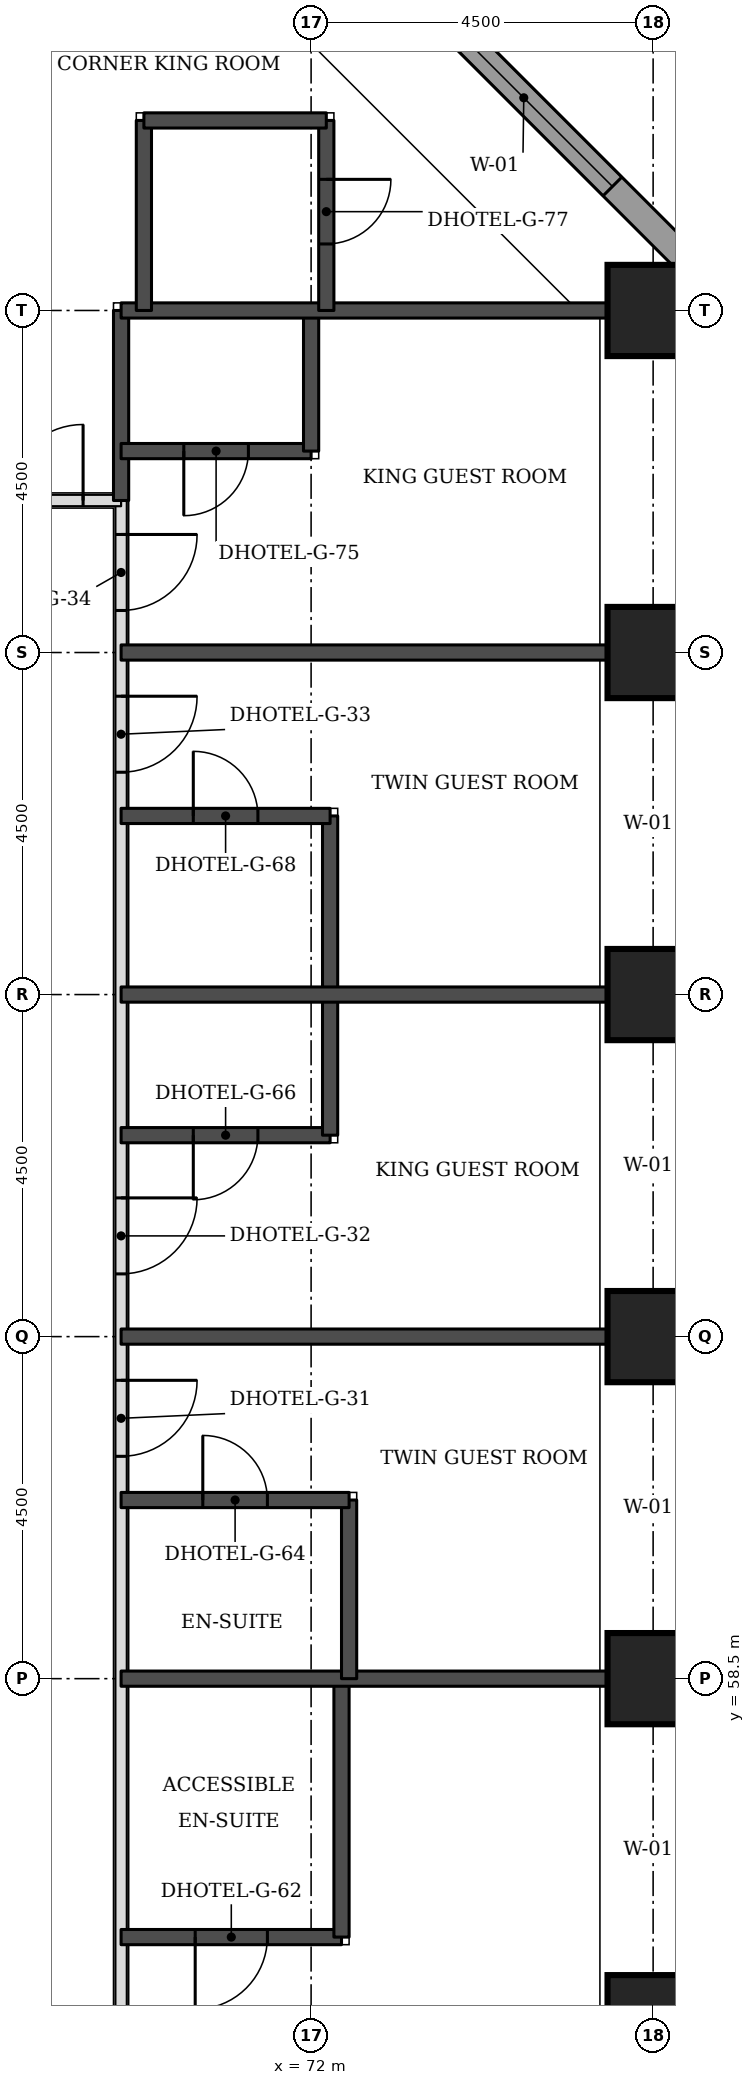
"""IFC4 building model, lengths in metres.
Left out: names, types, materials, properties, quantities, classifications, styles, units other than length and angle.
Written with IfcOpenShell. Run it as: python <this file> out.ifc"""

import sys

from ifc_helpers import new_model, si_unit, direction, frame, frame_2d, origin, origin_2d, place, context, subcontext, project, spatial, rectangle, extrude, element, fill, save


model = new_model("IFC4")
c1 = context("Model", 3, precision=1e-05, world=origin(), true_north=direction((0.0, 1.0)))
c2 = subcontext(c1, "Body", "Model", "MODEL_VIEW")
j1 = project(units=[si_unit("LENGTHUNIT", "METRE"), si_unit("PLANEANGLEUNIT", "RADIAN")], contexts=[c1])
p1 = place(None, origin())
s1 = spatial("IfcSite", under=j1, at=p1, CompositionType="ELEMENT")
p2 = place(p1, origin())
s2 = spatial("IfcBuilding", under=s1, at=p2, CompositionType="ELEMENT")
p3 = place(p2, frame((0.0, 0.0, 66.0)))
s3 = spatial("IfcBuildingStorey", under=s2, at=p3, CompositionType="ELEMENT", Elevation=66.0)
for number, where, z_axis, x_axis in (
    (1, (76.5, 54.0, 0.0), (0.0, 0.0, 1.0), (1.0, 0.0, 0.0)),
    (2, (76.5, 58.5, 0.0), (0.0, 0.0, 1.0), (1.0, 0.0, 0.0)),
    (3, (76.5, 63.0, 0.0), (0.0, 0.0, 1.0), (1.0, 0.0, 0.0)),
    (4, (76.5, 67.5, 0.0), (0.0, 0.0, 1.0), (1.0, 0.0, 0.0)),
    (5, (76.5, 72.0, 0.0), (0.0, 0.0, 1.0), (1.0, 0.0, 0.0)),
    (6, (76.5, 76.5, 0.0), (0.0, 0.0, 1.0), (1.0, 0.0, 0.0)),
):
    element("IfcColumn", number, at=place(p3, frame(where, z_axis=z_axis, x_axis=x_axis)), inside=s3, PredefinedType="COLUMN", context=c2, shape_type="SweptSolid", body=[
        extrude(rectangle(XDim=1.2, YDim=1.2, at=origin_2d()), origin(), (0.0, 0.0, 1.0), 3.3),
    ])
p4 = place(p3, frame((77.326, 76.77, 0.0), z_axis=(0.0, 0.0, 1.0), x_axis=(-0.707106781187, 0.707106781187, 0.0)))
e7 = element("IfcWall", 7, at=p4, inside=s3, PredefinedType="STANDARD", context=c2, shape_type="SweptSolid", body=[
    extrude(rectangle(XDim=7.151, YDim=0.35, at=frame_2d((3.576, 0.0))), origin(), (0.0, 0.0, 1.0), 3.055),
])
p5 = place(p4, frame((1.926, 0.0, 0.8)))
e8 = element("IfcOpeningElement", 8, at=p5, cuts=e7, PredefinedType="OPENING", context=c2, shape_type="SweptSolid", body=[
    extrude(rectangle(XDim=3.3, YDim=1.5, at=frame_2d((1.65, 0.75))), frame((0.0, 0.185, 0.0), z_axis=(0.0, -1.0, 0.0), x_axis=(1.0, 0.0, 0.0)), (0.0, 0.0, 1.0), 0.37),
])
p6 = place(p3, frame((69.5, 47.5, 0.0), z_axis=(0.0, 0.0, 1.0), x_axis=(0.0, 1.0, 0.0)))
e9 = element("IfcWall", 9, at=p6, inside=s3, PredefinedType="PARTITIONING", context=c2, shape_type="SweptSolid", body=[
    extrude(rectangle(XDim=26.5, YDim=0.15, at=frame_2d((13.25, 0.0))), origin(), (0.0, 0.0, 1.0), 3.08),
])
p7 = place(p6, frame((25.053, 0.0, 0.0)))
e10 = element("IfcOpeningElement", 10, at=p7, cuts=e9, PredefinedType="OPENING", context=c2, shape_type="SweptSolid", body=[
    extrude(rectangle(XDim=1.0, YDim=2.1, at=frame_2d((0.5, 1.05))), frame((0.0, 0.085, 0.0), z_axis=(0.0, -1.0, 0.0), x_axis=(1.0, 0.0, 0.0)), (0.0, 0.0, 1.0), 0.17),
])
p8 = place(p6, frame((22.925, 0.0, 0.0)))
e11 = element("IfcOpeningElement", 11, at=p8, cuts=e9, PredefinedType="OPENING", context=c2, shape_type="SweptSolid", body=[
    extrude(rectangle(XDim=1.0, YDim=2.1, at=frame_2d((0.5, 1.05))), frame((0.0, 0.085, 0.0), z_axis=(0.0, -1.0, 0.0), x_axis=(1.0, 0.0, 0.0)), (0.0, 0.0, 1.0), 0.17),
])
p9 = place(p6, frame((16.325, 0.0, 0.0)))
e12 = element("IfcOpeningElement", 12, at=p9, cuts=e9, PredefinedType="OPENING", context=c2, shape_type="SweptSolid", body=[
    extrude(rectangle(XDim=1.0, YDim=2.1, at=frame_2d((0.5, 1.05))), frame((0.0, 0.085, 0.0), z_axis=(0.0, -1.0, 0.0), x_axis=(1.0, 0.0, 0.0)), (0.0, 0.0, 1.0), 0.17),
])
p10 = place(p6, frame((13.925, 0.0, 0.0)))
e13 = element("IfcOpeningElement", 13, at=p10, cuts=e9, PredefinedType="OPENING", context=c2, shape_type="SweptSolid", body=[
    extrude(rectangle(XDim=1.0, YDim=2.1, at=frame_2d((0.5, 1.05))), frame((0.0, 0.085, 0.0), z_axis=(0.0, -1.0, 0.0), x_axis=(1.0, 0.0, 0.0)), (0.0, 0.0, 1.0), 0.17),
])
p11 = place(p6, frame((4.25, 0.0, 0.0)))
e14 = element("IfcOpeningElement", 14, at=p11, cuts=e9, PredefinedType="OPENING", context=c2, shape_type="SweptSolid", body=[
    extrude(rectangle(XDim=1.1, YDim=2.1, at=frame_2d((0.55, 1.05))), frame((0.0, 0.085, 0.0), z_axis=(0.0, -1.0, 0.0), x_axis=(1.0, 0.0, 0.0)), (0.0, 0.0, 1.0), 0.17),
])
p12 = place(p6, frame((0.447, 0.0, 0.0)))
e15 = element("IfcOpeningElement", 15, at=p12, cuts=e9, PredefinedType="OPENING", context=c2, shape_type="SweptSolid", body=[
    extrude(rectangle(XDim=1.0, YDim=2.1, at=frame_2d((0.5, 1.05))), frame((0.0, 0.085, 0.0), z_axis=(0.0, -1.0, 0.0), x_axis=(1.0, 0.0, 0.0)), (0.0, 0.0, 1.0), 0.17),
])
p13 = place(p3, frame((43.0, 74.0, 0.0), z_axis=(0.0, 0.0, 1.0), x_axis=(1.0, 0.0, 0.0)))
e16 = element("IfcWall", 16, at=p13, inside=s3, PredefinedType="PARTITIONING", context=c2, shape_type="SweptSolid", body=[
    extrude(rectangle(XDim=26.5, YDim=0.15, at=frame_2d((13.25, 0.0))), origin(), (0.0, 0.0, 1.0), 3.08),
])
p14 = place(p13, frame((4.925, 0.0, 0.0)))
e17 = element("IfcOpeningElement", 17, at=p14, cuts=e16, PredefinedType="OPENING", context=c2, shape_type="SweptSolid", body=[
    extrude(rectangle(XDim=1.0, YDim=2.1, at=frame_2d((0.5, 1.05))), frame((0.0, 0.085, 0.0), z_axis=(0.0, -1.0, 0.0), x_axis=(1.0, 0.0, 0.0)), (0.0, 0.0, 1.0), 0.17),
])
p15 = place(p13, frame((7.325, 0.0, 0.0)))
e18 = element("IfcOpeningElement", 18, at=p15, cuts=e16, PredefinedType="OPENING", context=c2, shape_type="SweptSolid", body=[
    extrude(rectangle(XDim=1.0, YDim=2.1, at=frame_2d((0.5, 1.05))), frame((0.0, 0.085, 0.0), z_axis=(0.0, -1.0, 0.0), x_axis=(1.0, 0.0, 0.0)), (0.0, 0.0, 1.0), 0.17),
])
p16 = place(p13, frame((13.925, 0.0, 0.0)))
e19 = element("IfcOpeningElement", 19, at=p16, cuts=e16, PredefinedType="OPENING", context=c2, shape_type="SweptSolid", body=[
    extrude(rectangle(XDim=1.0, YDim=2.1, at=frame_2d((0.5, 1.05))), frame((0.0, 0.085, 0.0), z_axis=(0.0, -1.0, 0.0), x_axis=(1.0, 0.0, 0.0)), (0.0, 0.0, 1.0), 0.17),
])
p17 = place(p13, frame((16.325, 0.0, 0.0)))
e20 = element("IfcOpeningElement", 20, at=p17, cuts=e16, PredefinedType="OPENING", context=c2, shape_type="SweptSolid", body=[
    extrude(rectangle(XDim=1.0, YDim=2.1, at=frame_2d((0.5, 1.05))), frame((0.0, 0.085, 0.0), z_axis=(0.0, -1.0, 0.0), x_axis=(1.0, 0.0, 0.0)), (0.0, 0.0, 1.0), 0.17),
])
p18 = place(p13, frame((22.925, 0.0, 0.0)))
e21 = element("IfcOpeningElement", 21, at=p18, cuts=e16, PredefinedType="OPENING", context=c2, shape_type="SweptSolid", body=[
    extrude(rectangle(XDim=1.0, YDim=2.1, at=frame_2d((0.5, 1.05))), frame((0.0, 0.085, 0.0), z_axis=(0.0, -1.0, 0.0), x_axis=(1.0, 0.0, 0.0)), (0.0, 0.0, 1.0), 0.17),
])
p19 = place(p13, frame((0.5, 0.0, 0.0)))
e22 = element("IfcOpeningElement", 22, at=p19, cuts=e16, PredefinedType="OPENING", context=c2, shape_type="SweptSolid", body=[
    extrude(rectangle(XDim=1.0, YDim=2.1, at=frame_2d((0.5, 1.05))), frame((0.0, 0.085, 0.0), z_axis=(0.0, -1.0, 0.0), x_axis=(1.0, 0.0, 0.0)), (0.0, 0.0, 1.0), 0.17),
])
p20 = place(p13, frame((25.0, 0.0, 0.0)))
e23 = element("IfcOpeningElement", 23, at=p20, cuts=e16, PredefinedType="OPENING", context=c2, shape_type="SweptSolid", body=[
    extrude(rectangle(XDim=1.0, YDim=2.1, at=frame_2d((0.5, 1.05))), frame((0.0, 0.085, 0.0), z_axis=(0.0, -1.0, 0.0), x_axis=(1.0, 0.0, 0.0)), (0.0, 0.0, 1.0), 0.17),
])
p21 = place(p3, frame((69.5, 55.1, 0.0), z_axis=(0.0, 0.0, 1.0), x_axis=(1.0, 0.0, 0.0)))
e24 = element("IfcWall", 24, at=p21, inside=s3, PredefinedType="SOLIDWALL", context=c2, shape_type="SweptSolid", body=[
    extrude(rectangle(XDim=2.9, YDim=0.2, at=frame_2d((1.45, 0.0))), origin(), (0.0, 0.0, 1.0), 3.08),
])
p22 = place(p21, frame((0.975, 0.0, 0.0)))
e25 = element("IfcOpeningElement", 25, at=p22, cuts=e24, PredefinedType="OPENING", context=c2, shape_type="SweptSolid", body=[
    extrude(rectangle(XDim=0.95, YDim=2.1, at=frame_2d((0.475, 1.05))), frame((0.0, 0.11, 0.0), z_axis=(0.0, -1.0, 0.0), x_axis=(1.0, 0.0, 0.0)), (0.0, 0.0, 1.0), 0.22),
])
p23 = place(p3, frame((72.4, 55.1, 0.0), z_axis=(0.0, 0.0, 1.0), x_axis=(0.0, 1.0, 0.0)))
e26 = element("IfcWall", 26, at=p23, inside=s3, PredefinedType="SOLIDWALL", context=c2, shape_type="SweptSolid", body=[
    extrude(rectangle(XDim=3.4, YDim=0.2, at=frame_2d((1.7, 0.0))), origin(), (0.0, 0.0, 1.0), 3.08),
])
p24 = place(p3, frame((69.5, 58.5, 0.0), z_axis=(0.0, 0.0, 1.0), x_axis=(1.0, 0.0, 0.0)))
e27 = element("IfcWall", 27, at=p24, inside=s3, PredefinedType="SOLIDWALL", context=c2, shape_type="SweptSolid", body=[
    extrude(rectangle(XDim=6.4, YDim=0.2, at=frame_2d((3.2, 0.0))), origin(), (0.0, 0.0, 1.0), 3.08),
])
p25 = place(p3, frame((72.5, 58.5, 0.0), z_axis=(0.0, 0.0, 1.0), x_axis=(0.0, 1.0, 0.0)))
e28 = element("IfcWall", 28, at=p25, inside=s3, PredefinedType="SOLIDWALL", context=c2, shape_type="SweptSolid", body=[
    extrude(rectangle(XDim=2.35, YDim=0.2, at=frame_2d((1.175, 0.0))), origin(), (0.0, 0.0, 1.0), 3.08),
])
p26 = place(p3, frame((69.5, 60.85, 0.0), z_axis=(0.0, 0.0, 1.0), x_axis=(1.0, 0.0, 0.0)))
e29 = element("IfcWall", 29, at=p26, inside=s3, PredefinedType="SOLIDWALL", context=c2, shape_type="SweptSolid", body=[
    extrude(rectangle(XDim=3.0, YDim=0.2, at=frame_2d((1.5, 0.0))), origin(), (0.0, 0.0, 1.0), 3.08),
])
p27 = place(p26, frame((1.075, 0.0, 0.0)))
e30 = element("IfcOpeningElement", 30, at=p27, cuts=e29, PredefinedType="OPENING", context=c2, shape_type="SweptSolid", body=[
    extrude(rectangle(XDim=0.85, YDim=2.1, at=frame_2d((0.425, 1.05))), frame((0.0, 0.11, 0.0), z_axis=(0.0, -1.0, 0.0), x_axis=(1.0, 0.0, 0.0)), (0.0, 0.0, 1.0), 0.22),
])
p28 = place(p3, frame((69.5, 63.0, 0.0), z_axis=(0.0, 0.0, 1.0), x_axis=(1.0, 0.0, 0.0)))
e31 = element("IfcWall", 31, at=p28, inside=s3, PredefinedType="SOLIDWALL", context=c2, shape_type="SweptSolid", body=[
    extrude(rectangle(XDim=6.4, YDim=0.2, at=frame_2d((3.2, 0.0))), origin(), (0.0, 0.0, 1.0), 3.08),
])
p29 = place(p3, frame((69.5, 65.65, 0.0), z_axis=(0.0, 0.0, 1.0), x_axis=(1.0, 0.0, 0.0)))
e32 = element("IfcWall", 32, at=p29, inside=s3, PredefinedType="SOLIDWALL", context=c2, shape_type="SweptSolid", body=[
    extrude(rectangle(XDim=2.75, YDim=0.2, at=frame_2d((1.375, 0.0))), origin(), (0.0, 0.0, 1.0), 3.08),
])
p30 = place(p29, frame((0.95, 0.0, 0.0)))
e33 = element("IfcOpeningElement", 33, at=p30, cuts=e32, PredefinedType="OPENING", context=c2, shape_type="SweptSolid", body=[
    extrude(rectangle(XDim=0.85, YDim=2.1, at=frame_2d((0.425, 1.05))), frame((0.0, 0.11, 0.0), z_axis=(0.0, -1.0, 0.0), x_axis=(1.0, 0.0, 0.0)), (0.0, 0.0, 1.0), 0.22),
])
p31 = place(p3, frame((72.25, 65.65, 0.0), z_axis=(0.0, 0.0, 1.0), x_axis=(0.0, 1.0, 0.0)))
e34 = element("IfcWall", 34, at=p31, inside=s3, PredefinedType="SOLIDWALL", context=c2, shape_type="SweptSolid", body=[
    extrude(rectangle(XDim=4.2, YDim=0.2, at=frame_2d((2.1, 0.0))), origin(), (0.0, 0.0, 1.0), 3.08),
])
p32 = place(p3, frame((69.5, 67.5, 0.0), z_axis=(0.0, 0.0, 1.0), x_axis=(1.0, 0.0, 0.0)))
e35 = element("IfcWall", 35, at=p32, inside=s3, PredefinedType="SOLIDWALL", context=c2, shape_type="SweptSolid", body=[
    extrude(rectangle(XDim=6.4, YDim=0.2, at=frame_2d((3.2, 0.0))), origin(), (0.0, 0.0, 1.0), 3.08),
])
p33 = place(p3, frame((69.5, 69.85, 0.0), z_axis=(0.0, 0.0, 1.0), x_axis=(1.0, 0.0, 0.0)))
e36 = element("IfcWall", 36, at=p33, inside=s3, PredefinedType="SOLIDWALL", context=c2, shape_type="SweptSolid", body=[
    extrude(rectangle(XDim=2.75, YDim=0.2, at=frame_2d((1.375, 0.0))), origin(), (0.0, 0.0, 1.0), 3.08),
])
p34 = place(p33, frame((0.95, 0.0, 0.0)))
e37 = element("IfcOpeningElement", 37, at=p34, cuts=e36, PredefinedType="OPENING", context=c2, shape_type="SweptSolid", body=[
    extrude(rectangle(XDim=0.85, YDim=2.1, at=frame_2d((0.425, 1.05))), frame((0.0, 0.11, 0.0), z_axis=(0.0, -1.0, 0.0), x_axis=(1.0, 0.0, 0.0)), (0.0, 0.0, 1.0), 0.22),
])
p35 = place(p3, frame((69.5, 72.0, 0.0), z_axis=(0.0, 0.0, 1.0), x_axis=(1.0, 0.0, 0.0)))
e38 = element("IfcWall", 38, at=p35, inside=s3, PredefinedType="SOLIDWALL", context=c2, shape_type="SweptSolid", body=[
    extrude(rectangle(XDim=6.4, YDim=0.2, at=frame_2d((3.2, 0.0))), origin(), (0.0, 0.0, 1.0), 3.08),
])
p36 = place(p3, frame((69.5, 74.0, 0.0), z_axis=(0.0, 0.0, 1.0), x_axis=(0.0, 1.0, 0.0)))
e39 = element("IfcWall", 39, at=p36, inside=s3, PredefinedType="SOLIDWALL", context=c2, shape_type="SweptSolid", body=[
    extrude(rectangle(XDim=2.5, YDim=0.2, at=frame_2d((1.25, 0.0))), origin(), (0.0, 0.0, 1.0), 3.08),
])
p37 = place(p3, frame((69.5, 74.65, 0.0), z_axis=(0.0, 0.0, 1.0), x_axis=(1.0, 0.0, 0.0)))
e40 = element("IfcWall", 40, at=p37, inside=s3, PredefinedType="SOLIDWALL", context=c2, shape_type="SweptSolid", body=[
    extrude(rectangle(XDim=2.5, YDim=0.2, at=frame_2d((1.25, 0.0))), origin(), (0.0, 0.0, 1.0), 3.08),
])
p38 = place(p37, frame((0.825, 0.0, 0.0)))
e41 = element("IfcOpeningElement", 41, at=p38, cuts=e40, PredefinedType="OPENING", context=c2, shape_type="SweptSolid", body=[
    extrude(rectangle(XDim=0.85, YDim=2.1, at=frame_2d((0.425, 1.05))), frame((0.0, 0.11, 0.0), z_axis=(0.0, -1.0, 0.0), x_axis=(1.0, 0.0, 0.0)), (0.0, 0.0, 1.0), 0.22),
])
p39 = place(p3, frame((72.0, 74.65, 0.0), z_axis=(0.0, 0.0, 1.0), x_axis=(0.0, 1.0, 0.0)))
e42 = element("IfcWall", 42, at=p39, inside=s3, PredefinedType="SOLIDWALL", context=c2, shape_type="SweptSolid", body=[
    extrude(rectangle(XDim=1.85, YDim=0.2, at=frame_2d((0.925, 0.0))), origin(), (0.0, 0.0, 1.0), 3.08),
])
p40 = place(p3, frame((69.5, 76.5, 0.0), z_axis=(0.0, 0.0, 1.0), x_axis=(1.0, 0.0, 0.0)))
e43 = element("IfcWall", 43, at=p40, inside=s3, PredefinedType="SOLIDWALL", context=c2, shape_type="SweptSolid", body=[
    extrude(rectangle(XDim=6.4, YDim=0.2, at=frame_2d((3.2, 0.0))), origin(), (0.0, 0.0, 1.0), 3.08),
])
p41 = place(p3, frame((69.8, 76.5, 0.0), z_axis=(0.0, 0.0, 1.0), x_axis=(0.0, 1.0, 0.0)))
e44 = element("IfcWall", 44, at=p41, inside=s3, PredefinedType="SOLIDWALL", context=c2, shape_type="SweptSolid", body=[
    extrude(rectangle(XDim=2.5, YDim=0.2, at=frame_2d((1.25, 0.0))), origin(), (0.0, 0.0, 1.0), 3.08),
])
p42 = place(p3, frame((72.2, 76.5, 0.0), z_axis=(0.0, 0.0, 1.0), x_axis=(0.0, 1.0, 0.0)))
e45 = element("IfcWall", 45, at=p42, inside=s3, PredefinedType="SOLIDWALL", context=c2, shape_type="SweptSolid", body=[
    extrude(rectangle(XDim=2.5, YDim=0.2, at=frame_2d((1.25, 0.0))), origin(), (0.0, 0.0, 1.0), 3.08),
])
p43 = place(p42, frame((0.875, 0.0, 0.0)))
e46 = element("IfcOpeningElement", 46, at=p43, cuts=e45, PredefinedType="OPENING", context=c2, shape_type="SweptSolid", body=[
    extrude(rectangle(XDim=0.85, YDim=2.1, at=frame_2d((0.425, 1.05))), frame((0.0, 0.11, 0.0), z_axis=(0.0, -1.0, 0.0), x_axis=(1.0, 0.0, 0.0)), (0.0, 0.0, 1.0), 0.22),
])
p44 = place(p3, frame((69.8, 79.0, 0.0), z_axis=(0.0, 0.0, 1.0), x_axis=(1.0, 0.0, 0.0)))
e47 = element("IfcWall", 47, at=p44, inside=s3, PredefinedType="SOLIDWALL", context=c2, shape_type="SweptSolid", body=[
    extrude(rectangle(XDim=2.4, YDim=0.2, at=frame_2d((1.2, 0.0))), origin(), (0.0, 0.0, 1.0), 3.08),
])
p45 = place(p5, origin())
e48 = element("IfcWindow", 48, at=p45, inside=s3, PartitioningType="SINGLE_PANEL", PredefinedType="WINDOW", context=c2, shape_type="SweptSolid", body=[
    extrude(rectangle(XDim=3.3, YDim=1.5, at=frame_2d((1.65, 0.75))), frame((0.0, 0.085, 0.0), z_axis=(0.0, -1.0, 0.0), x_axis=(1.0, 0.0, 0.0)), (0.0, 0.0, 1.0), 0.06),
])
fill(e8, e48)
p46 = place(p7, frame((1.0, 0.0, 0.0), z_axis=(0.0, 0.0, 1.0), x_axis=(-1.0, 0.0, 0.0)))
e49 = element("IfcDoor", 49, at=p46, inside=s3, OperationType="SINGLE_SWING_LEFT", PredefinedType="DOOR", context=c2, shape_type="SweptSolid", body=[
    extrude(rectangle(XDim=1.0, YDim=2.1, at=frame_2d((0.5, 1.05))), frame((0.0, 0.025, 0.0), z_axis=(0.0, -1.0, 0.0), x_axis=(1.0, 0.0, 0.0)), (0.0, 0.0, 1.0), 0.05),
])
fill(e10, e49)
p47 = place(p38, frame((0.85, 0.0, 0.0), z_axis=(0.0, 0.0, 1.0), x_axis=(-1.0, 0.0, 0.0)))
e50 = element("IfcDoor", 50, at=p47, inside=s3, OperationType="SINGLE_SWING_RIGHT", PredefinedType="DOOR", context=c2, shape_type="SweptSolid", body=[
    extrude(rectangle(XDim=0.85, YDim=2.1, at=frame_2d((0.425, 1.05))), frame((0.0, 0.025, 0.0), z_axis=(0.0, -1.0, 0.0), x_axis=(1.0, 0.0, 0.0)), (0.0, 0.0, 1.0), 0.05),
])
fill(e41, e50)
p48 = place(p8, frame((1.0, 0.0, 0.0), z_axis=(0.0, 0.0, 1.0), x_axis=(-1.0, 0.0, 0.0)))
e51 = element("IfcDoor", 51, at=p48, inside=s3, OperationType="SINGLE_SWING_LEFT", PredefinedType="DOOR", context=c2, shape_type="SweptSolid", body=[
    extrude(rectangle(XDim=1.0, YDim=2.1, at=frame_2d((0.5, 1.05))), frame((0.0, 0.025, 0.0), z_axis=(0.0, -1.0, 0.0), x_axis=(1.0, 0.0, 0.0)), (0.0, 0.0, 1.0), 0.05),
])
fill(e11, e51)
p49 = place(p34, origin())
e52 = element("IfcDoor", 52, at=p49, inside=s3, OperationType="SINGLE_SWING_LEFT", PredefinedType="DOOR", context=c2, shape_type="SweptSolid", body=[
    extrude(rectangle(XDim=0.85, YDim=2.1, at=frame_2d((0.425, 1.05))), frame((0.0, 0.025, 0.0), z_axis=(0.0, -1.0, 0.0), x_axis=(1.0, 0.0, 0.0)), (0.0, 0.0, 1.0), 0.05),
])
fill(e37, e52)
p50 = place(p9, frame((1.0, 0.0, 0.0), z_axis=(0.0, 0.0, 1.0), x_axis=(-1.0, 0.0, 0.0)))
e53 = element("IfcDoor", 53, at=p50, inside=s3, OperationType="SINGLE_SWING_LEFT", PredefinedType="DOOR", context=c2, shape_type="SweptSolid", body=[
    extrude(rectangle(XDim=1.0, YDim=2.1, at=frame_2d((0.5, 1.05))), frame((0.0, 0.025, 0.0), z_axis=(0.0, -1.0, 0.0), x_axis=(1.0, 0.0, 0.0)), (0.0, 0.0, 1.0), 0.05),
])
fill(e12, e53)
p51 = place(p30, frame((0.85, 0.0, 0.0), z_axis=(0.0, 0.0, 1.0), x_axis=(-1.0, 0.0, 0.0)))
e54 = element("IfcDoor", 54, at=p51, inside=s3, OperationType="SINGLE_SWING_RIGHT", PredefinedType="DOOR", context=c2, shape_type="SweptSolid", body=[
    extrude(rectangle(XDim=0.85, YDim=2.1, at=frame_2d((0.425, 1.05))), frame((0.0, 0.025, 0.0), z_axis=(0.0, -1.0, 0.0), x_axis=(1.0, 0.0, 0.0)), (0.0, 0.0, 1.0), 0.05),
])
fill(e33, e54)
p52 = place(p10, frame((1.0, 0.0, 0.0), z_axis=(0.0, 0.0, 1.0), x_axis=(-1.0, 0.0, 0.0)))
e55 = element("IfcDoor", 55, at=p52, inside=s3, OperationType="SINGLE_SWING_LEFT", PredefinedType="DOOR", context=c2, shape_type="SweptSolid", body=[
    extrude(rectangle(XDim=1.0, YDim=2.1, at=frame_2d((0.5, 1.05))), frame((0.0, 0.025, 0.0), z_axis=(0.0, -1.0, 0.0), x_axis=(1.0, 0.0, 0.0)), (0.0, 0.0, 1.0), 0.05),
])
fill(e13, e55)
p53 = place(p27, origin())
e56 = element("IfcDoor", 56, at=p53, inside=s3, OperationType="SINGLE_SWING_LEFT", PredefinedType="DOOR", context=c2, shape_type="SweptSolid", body=[
    extrude(rectangle(XDim=0.85, YDim=2.1, at=frame_2d((0.425, 1.05))), frame((0.0, 0.025, 0.0), z_axis=(0.0, -1.0, 0.0), x_axis=(1.0, 0.0, 0.0)), (0.0, 0.0, 1.0), 0.05),
])
fill(e30, e56)
p54 = place(p22, frame((0.95, 0.0, 0.0), z_axis=(0.0, 0.0, 1.0), x_axis=(-1.0, 0.0, 0.0)))
e57 = element("IfcDoor", 57, at=p54, inside=s3, OperationType="SINGLE_SWING_RIGHT", PredefinedType="DOOR", context=c2, shape_type="SweptSolid", body=[
    extrude(rectangle(XDim=0.95, YDim=2.1, at=frame_2d((0.475, 1.05))), frame((0.0, 0.025, 0.0), z_axis=(0.0, -1.0, 0.0), x_axis=(1.0, 0.0, 0.0)), (0.0, 0.0, 1.0), 0.05),
])
fill(e25, e57)
p55 = place(p20, origin())
e58 = element("IfcDoor", 58, at=p55, inside=s3, OperationType="SINGLE_SWING_RIGHT", PredefinedType="DOOR", context=c2, shape_type="SweptSolid", body=[
    extrude(rectangle(XDim=1.0, YDim=2.1, at=frame_2d((0.5, 1.05))), frame((0.0, 0.025, 0.0), z_axis=(0.0, -1.0, 0.0), x_axis=(1.0, 0.0, 0.0)), (0.0, 0.0, 1.0), 0.05),
])
fill(e23, e58)
p56 = place(p43, frame((0.85, 0.0, 0.0), z_axis=(0.0, 0.0, 1.0), x_axis=(-1.0, 0.0, 0.0)))
e59 = element("IfcDoor", 59, at=p56, inside=s3, OperationType="SINGLE_SWING_LEFT", PredefinedType="DOOR", context=c2, shape_type="SweptSolid", body=[
    extrude(rectangle(XDim=0.85, YDim=2.1, at=frame_2d((0.425, 1.05))), frame((0.0, 0.025, 0.0), z_axis=(0.0, -1.0, 0.0), x_axis=(1.0, 0.0, 0.0)), (0.0, 0.0, 1.0), 0.05),
])
fill(e46, e59)
save(model, sys.argv[1])
